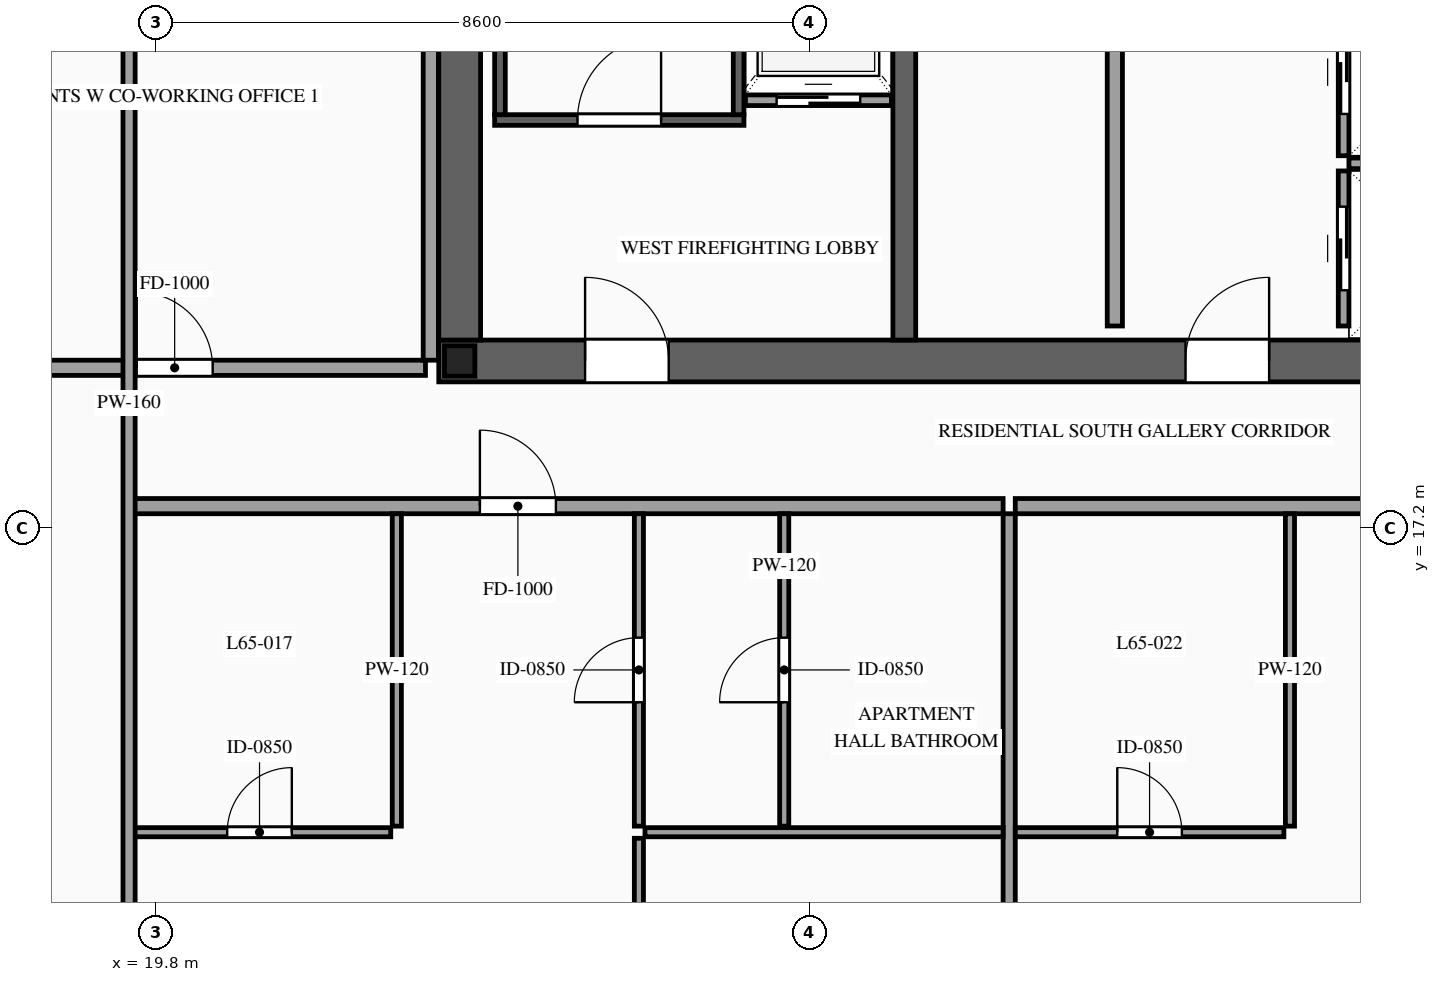
"""IFC4 building model, lengths in metres.
Left out: names, types, materials, properties, quantities, classifications, styles, units other than length and angle.
Written with IfcOpenShell. Run it as: python <this file> out.ifc"""

import sys

from ifc_helpers import new_model, si_unit, direction, frame, frame_2d, origin, origin_2d, place, context, subcontext, project, spatial, rectangle, i_section, extrude, source, transform, mapped, element, fill, save


model = new_model("IFC4")
c1 = context("Model", 3, precision=1e-05, world=origin(), true_north=direction((0.0, 1.0)))
c2 = subcontext(c1, "Body", "Model", "MODEL_VIEW")
j1 = project(units=[si_unit("LENGTHUNIT", "METRE"), si_unit("PLANEANGLEUNIT", "RADIAN")], contexts=[c1])
p1 = place(None, origin())
s1 = spatial("IfcSite", under=j1, at=p1, CompositionType="ELEMENT")
p2 = place(p1, origin())
s2 = spatial("IfcBuilding", under=s1, at=p2, CompositionType="ELEMENT")
p3 = place(p2, frame((0.0, 0.0, 245.1)))
s3 = spatial("IfcBuildingStorey", under=s2, at=p3, CompositionType="ELEMENT", Elevation=245.1)
p4 = place(p3, frame((23.525, 19.4, 0.0), z_axis=(0.0, 0.0, 1.0), x_axis=(1.0, 0.0, 0.0)))
e1 = element("IfcWall", 1, at=p4, inside=s3, PredefinedType="SHEAR", context=c2, shape_type="SweptSolid", body=[
    extrude(rectangle(XDim=26.95, YDim=0.55, at=frame_2d((13.475, 0.0))), origin(), (0.0, 0.0, 1.0), 3.5),
])
p5 = place(p4, frame((1.925, 0.0, 0.0)))
e2 = element("IfcOpeningElement", 2, at=p5, cuts=e1, PredefinedType="OPENING", context=c2, shape_type="SweptSolid", body=[
    extrude(rectangle(XDim=1.1, YDim=2.2, at=frame_2d((0.55, 1.1))), frame((0.0, 0.29, 0.0), z_axis=(0.0, -1.0, 0.0), x_axis=(1.0, 0.0, 0.0)), (0.0, 0.0, 1.0), 0.58),
])
p6 = place(p4, frame((9.825, 0.0, 0.0)))
e3 = element("IfcOpeningElement", 3, at=p6, cuts=e1, PredefinedType="OPENING", context=c2, shape_type="SweptSolid", body=[
    extrude(rectangle(XDim=1.1, YDim=2.2, at=frame_2d((0.55, 1.1))), frame((0.0, 0.29, 0.0), z_axis=(0.0, -1.0, 0.0), x_axis=(1.0, 0.0, 0.0)), (0.0, 0.0, 1.0), 0.58),
])
p7 = place(p4, frame((23.025, 0.0, 0.0)))
e4 = element("IfcOpeningElement", 4, at=p7, cuts=e1, PredefinedType="OPENING", context=c2, shape_type="SweptSolid", body=[
    extrude(rectangle(XDim=1.1, YDim=2.2, at=frame_2d((0.55, 1.1))), frame((0.0, 0.29, 0.0), z_axis=(0.0, -1.0, 0.0), x_axis=(1.0, 0.0, 0.0)), (0.0, 0.0, 1.0), 0.58),
])
p8 = place(p4, frame((19.645, 0.0, 0.0)))
e5 = element("IfcOpeningElement", 5, at=p8, cuts=e1, PredefinedType="OPENING", context=c2, shape_type="SweptSolid", body=[
    extrude(rectangle(XDim=0.9, YDim=2.15, at=frame_2d((0.45, 1.075))), frame((0.0, 0.29, 0.0), z_axis=(0.0, -1.0, 0.0), x_axis=(1.0, 0.0, 0.0)), (0.0, 0.0, 1.0), 0.58),
])
p9 = place(p4, frame((18.205, 0.0, 0.0)))
e6 = element("IfcOpeningElement", 6, at=p9, cuts=e1, PredefinedType="OPENING", context=c2, shape_type="SweptSolid", body=[
    extrude(rectangle(XDim=0.9, YDim=2.15, at=frame_2d((0.45, 1.075))), frame((0.0, 0.29, 0.0), z_axis=(0.0, -1.0, 0.0), x_axis=(1.0, 0.0, 0.0)), (0.0, 0.0, 1.0), 0.58),
])
m1 = source(origin(), c2, "Body", "SweptSolid", [
    extrude(rectangle(XDim=12.25, YDim=0.55, at=frame_2d((6.125, 0.0))), origin(), (0.0, 0.0, 1.0), 3.5),
])
p10 = place(p3, frame((23.8, 19.675, 0.0), z_axis=(0.0, 0.0, 1.0), x_axis=(0.0, 1.0, 0.0)))
e7 = element("IfcWall", 7, at=p10, inside=s3, PredefinedType="SHEAR", context=c2, shape_type="MappedRepresentation", body=[
    mapped(m1, transform((0.0, 0.0, 0.0), scale=1.0)),
])
m2 = source(origin(), c2, "Body", "SweptSolid", [
    extrude(rectangle(XDim=12.25, YDim=0.3, at=frame_2d((6.125, 0.0))), origin(), (0.0, 0.0, 1.0), 3.5),
])
p11 = place(p3, frame((29.65, 19.675, 0.0), z_axis=(0.0, 0.0, 1.0), x_axis=(0.0, 1.0, 0.0)))
e8 = element("IfcWall", 8, at=p11, inside=s3, PredefinedType="SOLIDWALL", context=c2, shape_type="MappedRepresentation", body=[
    mapped(m2, transform((0.0, 0.0, 0.0), scale=1.0)),
])
m3 = source(origin(), c2, "Body", "SweptSolid", [
    extrude(i_section(OverallWidth=0.4, OverallDepth=0.4, WebThickness=0.013, FlangeThickness=0.021, at=origin_2d()), origin(), (0.0, 0.0, 1.0), 3.5),
])
p12 = place(p3, frame((23.8, 19.4, 0.0), z_axis=(0.0, 0.0, 1.0), x_axis=(1.0, 0.0, 0.0)))
e9 = element("IfcColumn", 9, at=p12, inside=s3, PredefinedType="COLUMN", context=c2, shape_type="MappedRepresentation", body=[
    mapped(m3, transform((0.0, 0.0, 0.0), scale=1.0)),
])
p13 = place(p3, frame((27.56, 22.83, 0.0), z_axis=(0.0, 0.0, 1.0), x_axis=(1.0, 0.0, 0.0)))
e10 = element("IfcWall", 10, at=p13, inside=s3, PredefinedType="SOLIDWALL", context=c2, shape_type="SweptSolid", body=[
    extrude(rectangle(XDim=1.92, YDim=0.14, at=frame_2d((0.96, 0.0))), origin(), (0.0, 0.0, 1.0), 3.28),
])
p14 = place(p13, frame((0.41, 0.0, 0.0)))
e11 = element("IfcOpeningElement", 11, at=p14, cuts=e10, PredefinedType="OPENING", context=c2, shape_type="SweptSolid", body=[
    extrude(rectangle(XDim=1.1, YDim=2.2, at=frame_2d((0.55, 1.1))), frame((0.0, 0.085, 0.0), z_axis=(0.0, -1.0, 0.0), x_axis=(1.0, 0.0, 0.0)), (0.0, 0.0, 1.0), 0.17),
])
p15 = place(p3, frame((35.43, 19.86, 0.0), z_axis=(0.0, 0.0, 1.0), x_axis=(0.0, 1.0, 0.0)))
e12 = element("IfcWall", 12, at=p15, inside=s3, PredefinedType="SOLIDWALL", context=c2, shape_type="SweptSolid", body=[
    extrude(rectangle(XDim=2.04, YDim=0.14, at=frame_2d((1.02, 0.0))), origin(), (0.0, 0.0, 1.0), 3.28),
])
p16 = place(p15, frame((0.47, 0.0, 0.0)))
e13 = element("IfcOpeningElement", 13, at=p16, cuts=e12, PredefinedType="OPENING", context=c2, shape_type="SweptSolid", body=[
    extrude(rectangle(XDim=1.1, YDim=2.2, at=frame_2d((0.55, 1.1))), frame((0.0, 0.085, 0.0), z_axis=(0.0, -1.0, 0.0), x_axis=(1.0, 0.0, 0.0)), (0.0, 0.0, 1.0), 0.17),
])
m4 = source(origin(), c2, "Body", "SweptSolid", [
    extrude(rectangle(XDim=2.4, YDim=0.14, at=frame_2d((1.2, 0.0))), origin(), (0.0, 0.0, 1.0), 3.28),
])
p17 = place(p3, frame((35.5, 22.0, 0.0), z_axis=(0.0, 0.0, 1.0), x_axis=(1.0, 0.0, 0.0)))
e14 = element("IfcWall", 14, at=p17, inside=s3, PredefinedType="SOLIDWALL", context=c2, shape_type="MappedRepresentation", body=[
    mapped(m4, transform((0.0, 0.0, 0.0), scale=1.0)),
])
p18 = place(p3, frame((35.43, 22.1, 0.0), z_axis=(0.0, 0.0, 1.0), x_axis=(0.0, 1.0, 0.0)))
e15 = element("IfcWall", 15, at=p18, inside=s3, PredefinedType="SOLIDWALL", context=c2, shape_type="SweptSolid", body=[
    extrude(rectangle(XDim=2.2, YDim=0.14, at=frame_2d((1.1, 0.0))), origin(), (0.0, 0.0, 1.0), 3.28),
])
p19 = place(p18, frame((0.55, 0.0, 0.0)))
e16 = element("IfcOpeningElement", 16, at=p19, cuts=e15, PredefinedType="OPENING", context=c2, shape_type="SweptSolid", body=[
    extrude(rectangle(XDim=1.1, YDim=2.2, at=frame_2d((0.55, 1.1))), frame((0.0, 0.085, 0.0), z_axis=(0.0, -1.0, 0.0), x_axis=(1.0, 0.0, 0.0)), (0.0, 0.0, 1.0), 0.17),
])
p20 = place(p3, frame((24.26, 22.57, 0.0), z_axis=(0.0, 0.0, 1.0), x_axis=(1.0, 0.0, 0.0)))
e17 = element("IfcWall", 17, at=p20, inside=s3, PredefinedType="SOLIDWALL", context=c2, shape_type="SweptSolid", body=[
    extrude(rectangle(XDim=3.28, YDim=0.14, at=frame_2d((1.64, 0.0))), origin(), (0.0, 0.0, 1.0), 3.28),
])
p21 = place(p20, frame((1.09, 0.0, 0.0)))
e18 = element("IfcOpeningElement", 18, at=p21, cuts=e17, PredefinedType="OPENING", context=c2, shape_type="SweptSolid", body=[
    extrude(rectangle(XDim=1.1, YDim=2.2, at=frame_2d((0.55, 1.1))), frame((0.0, 0.085, 0.0), z_axis=(0.0, -1.0, 0.0), x_axis=(1.0, 0.0, 0.0)), (0.0, 0.0, 1.0), 0.17),
])
m5 = source(origin(), c2, "Body", "SweptSolid", [
    extrude(rectangle(XDim=8.94, YDim=0.14, at=frame_2d((4.47, 0.0))), origin(), (0.0, 0.0, 1.0), 3.28),
])
for number, where, z_axis, x_axis in (
    (19, (24.33, 22.64, 0.0), (0.0, 0.0, 1.0), (0.0, 1.0, 0.0)),
    (20, (27.47, 22.64, 0.0), (0.0, 0.0, 1.0), (0.0, 1.0, 0.0)),
):
    element("IfcWall", number, at=place(p3, frame(where, z_axis=z_axis, x_axis=x_axis)), inside=s3, PredefinedType="SOLIDWALL", context=c2, shape_type="MappedRepresentation", body=[
        mapped(m5, transform((0.0, 0.0, 0.0), scale=1.0)),
    ])
p22 = place(p3, frame((32.42, 19.86, 0.0), z_axis=(0.0, 0.0, 1.0), x_axis=(0.0, 1.0, 0.0)))
e21 = element("IfcWall", 21, at=p22, inside=s3, PredefinedType="PARTITIONING", context=c2, shape_type="SweptSolid", body=[
    extrude(rectangle(XDim=11.88, YDim=0.2, at=frame_2d((5.94, 0.0))), origin(), (0.0, 0.0, 1.0), 3.28),
])
p23 = place(p22, frame((5.49, 0.0, 0.0)))
e22 = element("IfcOpeningElement", 22, at=p23, cuts=e21, PredefinedType="OPENING", context=c2, shape_type="SweptSolid", body=[
    extrude(rectangle(XDim=0.9, YDim=2.15, at=frame_2d((0.45, 1.075))), frame((0.0, 0.115, 0.0), z_axis=(0.0, -1.0, 0.0), x_axis=(1.0, 0.0, 0.0)), (0.0, 0.0, 1.0), 0.23),
])
p24 = place(p3, frame((19.44, 17.49, 0.0), z_axis=(0.0, 0.0, 1.0), x_axis=(1.0, 0.0, 0.0)))
e23 = element("IfcWall", 23, at=p24, inside=s3, PredefinedType="PARTITIONING", context=c2, shape_type="SweptSolid", body=[
    extrude(rectangle(XDim=11.51, YDim=0.2, at=frame_2d((5.755, 0.0))), origin(), (0.0, 0.0, 1.0), 3.28),
])
p25 = place(p24, frame((4.626, 0.0, 0.0)))
e24 = element("IfcOpeningElement", 24, at=p25, cuts=e23, PredefinedType="OPENING", context=c2, shape_type="SweptSolid", body=[
    extrude(rectangle(XDim=1.0, YDim=2.2, at=frame_2d((0.5, 1.1))), frame((0.0, 0.115, 0.0), z_axis=(0.0, -1.0, 0.0), x_axis=(1.0, 0.0, 0.0)), (0.0, 0.0, 1.0), 0.23),
])
m6 = source(origin(), c2, "Body", "SweptSolid", [
    extrude(rectangle(XDim=12.04, YDim=0.16, at=frame_2d((6.02, 0.0))), origin(), (0.0, 0.0, 1.0), 3.28),
])
p26 = place(p3, frame((31.03, 5.35, 0.0), z_axis=(0.0, 0.0, 1.0), x_axis=(0.0, 1.0, 0.0)))
e25 = element("IfcWall", 25, at=p26, inside=s3, PredefinedType="PARTITIONING", context=c2, shape_type="MappedRepresentation", body=[
    mapped(m6, transform((0.0, 0.0, 0.0), scale=1.0)),
])
p27 = place(p3, frame((19.44, 13.2, 0.0), z_axis=(0.0, 0.0, 1.0), x_axis=(1.0, 0.0, 0.0)))
e26 = element("IfcWall", 26, at=p27, inside=s3, PredefinedType="PARTITIONING", context=c2, shape_type="SweptSolid", body=[
    extrude(rectangle(XDim=3.453, YDim=0.12, at=frame_2d((1.727, 0.0))), origin(), (0.0, 0.0, 1.0), 3.28),
])
p28 = place(p27, frame((1.302, 0.0, 0.0)))
e27 = element("IfcOpeningElement", 27, at=p28, cuts=e26, PredefinedType="OPENING", context=c2, shape_type="SweptSolid", body=[
    extrude(rectangle(XDim=0.85, YDim=2.1, at=frame_2d((0.425, 1.05))), frame((0.0, 0.075, 0.0), z_axis=(0.0, -1.0, 0.0), x_axis=(1.0, 0.0, 0.0)), (0.0, 0.0, 1.0), 0.15),
])
m7 = source(origin(), c2, "Body", "SweptSolid", [
    extrude(rectangle(XDim=4.11, YDim=0.12, at=frame_2d((2.055, 0.0))), origin(), (0.0, 0.0, 1.0), 3.28),
])
p29 = place(p3, frame((22.973, 13.28, 0.0), z_axis=(0.0, 0.0, 1.0), x_axis=(0.0, 1.0, 0.0)))
e28 = element("IfcWall", 28, at=p29, inside=s3, PredefinedType="PARTITIONING", context=c2, shape_type="MappedRepresentation", body=[
    mapped(m7, transform((0.0, 0.0, 0.0), scale=1.0)),
])
p30 = place(p3, frame((28.07, 13.28, 0.0), z_axis=(0.0, 0.0, 1.0), x_axis=(0.0, 1.0, 0.0)))
e29 = element("IfcWall", 29, at=p30, inside=s3, PredefinedType="PARTITIONING", context=c2, shape_type="SweptSolid", body=[
    extrude(rectangle(XDim=4.11, YDim=0.12, at=frame_2d((2.055, 0.0))), origin(), (0.0, 0.0, 1.0), 3.28),
])
p31 = place(p30, frame((1.63, 0.0, 0.0)))
e30 = element("IfcOpeningElement", 30, at=p31, cuts=e29, PredefinedType="OPENING", context=c2, shape_type="SweptSolid", body=[
    extrude(rectangle(XDim=0.85, YDim=2.1, at=frame_2d((0.425, 1.05))), frame((0.0, 0.075, 0.0), z_axis=(0.0, -1.0, 0.0), x_axis=(1.0, 0.0, 0.0)), (0.0, 0.0, 1.0), 0.15),
])
m8 = source(origin(), c2, "Body", "SweptSolid", [
    extrude(rectangle(XDim=4.712, YDim=0.12, at=frame_2d((2.356, 0.0))), origin(), (0.0, 0.0, 1.0), 3.28),
])
p32 = place(p3, frame((26.238, 13.2, 0.0), z_axis=(0.0, 0.0, 1.0), x_axis=(1.0, 0.0, 0.0)))
e31 = element("IfcWall", 31, at=p32, inside=s3, PredefinedType="PARTITIONING", context=c2, shape_type="MappedRepresentation", body=[
    mapped(m8, transform((0.0, 0.0, 0.0), scale=1.0)),
])
p33 = place(p3, frame((26.158, 5.35, 0.0), z_axis=(0.0, 0.0, 1.0), x_axis=(0.0, 1.0, 0.0)))
e32 = element("IfcWall", 32, at=p33, inside=s3, PredefinedType="PARTITIONING", context=c2, shape_type="SweptSolid", body=[
    extrude(rectangle(XDim=7.77, YDim=0.12, at=frame_2d((3.885, 0.0))), origin(), (0.0, 0.0, 1.0), 3.28),
])
p34 = place(p33, frame((3.435, 0.0, 0.0)))
e33 = element("IfcOpeningElement", 33, at=p34, cuts=e32, PredefinedType="OPENING", context=c2, shape_type="SweptSolid", body=[
    extrude(rectangle(XDim=0.9, YDim=2.15, at=frame_2d((0.45, 1.075))), frame((0.0, 0.075, 0.0), z_axis=(0.0, -1.0, 0.0), x_axis=(1.0, 0.0, 0.0)), (0.0, 0.0, 1.0), 0.15),
])
p35 = place(p3, frame((26.158, 13.28, 0.0), z_axis=(0.0, 0.0, 1.0), x_axis=(0.0, 1.0, 0.0)))
e34 = element("IfcWall", 34, at=p35, inside=s3, PredefinedType="PARTITIONING", context=c2, shape_type="SweptSolid", body=[
    extrude(rectangle(XDim=4.11, YDim=0.12, at=frame_2d((2.055, 0.0))), origin(), (0.0, 0.0, 1.0), 3.28),
])
p36 = place(p35, frame((1.63, 0.0, 0.0)))
e35 = element("IfcOpeningElement", 35, at=p36, cuts=e34, PredefinedType="OPENING", context=c2, shape_type="SweptSolid", body=[
    extrude(rectangle(XDim=0.85, YDim=2.1, at=frame_2d((0.425, 1.05))), frame((0.0, 0.075, 0.0), z_axis=(0.0, -1.0, 0.0), x_axis=(1.0, 0.0, 0.0)), (0.0, 0.0, 1.0), 0.15),
])
p37 = place(p3, frame((31.11, 17.49, 0.0), z_axis=(0.0, 0.0, 1.0), x_axis=(1.0, 0.0, 0.0)))
e36 = element("IfcWall", 36, at=p37, inside=s3, PredefinedType="PARTITIONING", context=c2, shape_type="SweptSolid", body=[
    extrude(rectangle(XDim=11.78, YDim=0.2, at=frame_2d((5.89, 0.0))), origin(), (0.0, 0.0, 1.0), 3.28),
])
p38 = place(p37, frame((4.801, 0.0, 0.0)))
e37 = element("IfcOpeningElement", 37, at=p38, cuts=e36, PredefinedType="OPENING", context=c2, shape_type="SweptSolid", body=[
    extrude(rectangle(XDim=1.0, YDim=2.2, at=frame_2d((0.5, 1.1))), frame((0.0, 0.115, 0.0), z_axis=(0.0, -1.0, 0.0), x_axis=(1.0, 0.0, 0.0)), (0.0, 0.0, 1.0), 0.23),
])
p39 = place(p3, frame((31.11, 13.2, 0.0), z_axis=(0.0, 0.0, 1.0), x_axis=(1.0, 0.0, 0.0)))
e38 = element("IfcWall", 38, at=p39, inside=s3, PredefinedType="PARTITIONING", context=c2, shape_type="SweptSolid", body=[
    extrude(rectangle(XDim=3.534, YDim=0.12, at=frame_2d((1.767, 0.0))), origin(), (0.0, 0.0, 1.0), 3.28),
])
p40 = place(p39, frame((1.342, 0.0, 0.0)))
e39 = element("IfcOpeningElement", 39, at=p40, cuts=e38, PredefinedType="OPENING", context=c2, shape_type="SweptSolid", body=[
    extrude(rectangle(XDim=0.85, YDim=2.1, at=frame_2d((0.425, 1.05))), frame((0.0, 0.075, 0.0), z_axis=(0.0, -1.0, 0.0), x_axis=(1.0, 0.0, 0.0)), (0.0, 0.0, 1.0), 0.15),
])
p41 = place(p3, frame((34.724, 13.28, 0.0), z_axis=(0.0, 0.0, 1.0), x_axis=(0.0, 1.0, 0.0)))
e40 = element("IfcWall", 40, at=p41, inside=s3, PredefinedType="PARTITIONING", context=c2, shape_type="MappedRepresentation", body=[
    mapped(m7, transform((0.0, 0.0, 0.0), scale=1.0)),
])
p42 = place(p3, frame((16.55, 19.31, 0.0), z_axis=(0.0, 0.0, 1.0), x_axis=(1.0, 0.0, 0.0)))
e41 = element("IfcWall", 41, at=p42, inside=s3, PredefinedType="PARTITIONING", context=c2, shape_type="SweptSolid", body=[
    extrude(rectangle(XDim=6.8, YDim=0.2, at=frame_2d((3.4, 0.0))), origin(), (0.0, 0.0, 1.0), 2.825),
])
p43 = place(p42, frame((3.0, 0.0, 0.0)))
e42 = element("IfcOpeningElement", 42, at=p43, cuts=e41, PredefinedType="OPENING", context=c2, shape_type="SweptSolid", body=[
    extrude(rectangle(XDim=1.0, YDim=2.2, at=frame_2d((0.5, 1.1))), frame((0.0, 0.115, 0.0), z_axis=(0.0, -1.0, 0.0), x_axis=(1.0, 0.0, 0.0)), (0.0, 0.0, 1.0), 0.23),
])
m9 = source(origin(), c2, "Body", "SweptSolid", [
    extrude(rectangle(XDim=6.29, YDim=0.2, at=frame_2d((3.145, 0.0))), origin(), (0.0, 0.0, 1.0), 3.28),
])
p44 = place(p3, frame((23.42, 19.41, 0.0), z_axis=(0.0, 0.0, 1.0), x_axis=(0.0, 1.0, 0.0)))
e43 = element("IfcWall", 43, at=p44, inside=s3, PredefinedType="PARTITIONING", context=c2, shape_type="MappedRepresentation", body=[
    mapped(m9, transform((0.0, 0.0, 0.0), scale=1.0)),
])
m10 = source(origin(), c2, "Body", "SweptSolid", [
    extrude(rectangle(XDim=26.69, YDim=0.16, at=frame_2d((13.345, 0.0))), origin(), (0.0, 0.0, 1.0), 3.28),
])
p45 = place(p3, frame((19.45, 5.5, 0.0), z_axis=(0.0, 0.0, 1.0), x_axis=(0.0, 1.0, 0.0)))
e44 = element("IfcWall", 44, at=p45, inside=s3, PredefinedType="PARTITIONING", context=c2, shape_type="MappedRepresentation", body=[
    mapped(m10, transform((0.0, 0.0, 0.0), scale=1.0)),
])
m11 = source(origin(), c2, "Body", "SweptSolid", [
    extrude(rectangle(XDim=1.1, YDim=2.2, at=frame_2d((0.55, 1.1))), frame((0.0, 0.025, 0.0), z_axis=(0.0, -1.0, 0.0), x_axis=(1.0, 0.0, 0.0)), (0.0, 0.0, 1.0), 0.05),
])
p46 = place(p14, origin())
e45 = element("IfcDoor", 45, at=p46, inside=s3, OperationType="SLIDING_TO_LEFT", PredefinedType="DOOR", context=c2, shape_type="MappedRepresentation", body=[
    mapped(m11, transform((0.0, 0.0, 0.0), scale=1.0)),
])
fill(e11, e45)
p47 = place(p16, origin())
e46 = element("IfcDoor", 46, at=p47, inside=s3, OperationType="SLIDING_TO_RIGHT", PredefinedType="DOOR", context=c2, shape_type="MappedRepresentation", body=[
    mapped(m11, transform((0.0, 0.0, 0.0), scale=1.0)),
])
fill(e13, e46)
p48 = place(p19, origin())
e47 = element("IfcDoor", 47, at=p48, inside=s3, OperationType="SLIDING_TO_LEFT", PredefinedType="DOOR", context=c2, shape_type="MappedRepresentation", body=[
    mapped(m11, transform((0.0, 0.0, 0.0), scale=1.0)),
])
fill(e16, e47)
m12 = source(origin(), c2, "Body", "SweptSolid", [
    extrude(rectangle(XDim=1.1, YDim=2.2, at=frame_2d((0.55, 1.1))), frame((0.0, 0.025, 0.0), z_axis=(0.0, -1.0, 0.0), x_axis=(1.0, 0.0, 0.0)), (0.0, 0.0, 1.0), 0.05),
])
p49 = place(p21, origin())
e48 = element("IfcDoor", 48, at=p49, inside=s3, OperationType="SINGLE_SWING_RIGHT", PredefinedType="DOOR", context=c2, shape_type="MappedRepresentation", body=[
    mapped(m12, transform((0.0, 0.0, 0.0), scale=1.0)),
])
fill(e18, e48)
p50 = place(p5, origin())
e49 = element("IfcDoor", 49, at=p50, inside=s3, OperationType="SINGLE_SWING_LEFT", PredefinedType="DOOR", context=c2, shape_type="MappedRepresentation", body=[
    mapped(m12, transform((0.0, 0.0, 0.0), scale=1.0)),
])
fill(e2, e49)
p51 = place(p6, origin())
e50 = element("IfcDoor", 50, at=p51, inside=s3, OperationType="SINGLE_SWING_RIGHT", PredefinedType="DOOR", context=c2, shape_type="MappedRepresentation", body=[
    mapped(m12, transform((0.0, 0.0, 0.0), scale=1.0)),
])
fill(e3, e50)
m13 = source(origin(), c2, "Body", "SweptSolid", [
    extrude(rectangle(XDim=1.0, YDim=2.2, at=frame_2d((0.5, 1.1))), frame((0.0, 0.025, 0.0), z_axis=(0.0, -1.0, 0.0), x_axis=(1.0, 0.0, 0.0)), (0.0, 0.0, 1.0), 0.05),
])
p52 = place(p25, origin())
e51 = element("IfcDoor", 51, at=p52, inside=s3, OperationType="SINGLE_SWING_LEFT", PredefinedType="DOOR", context=c2, shape_type="MappedRepresentation", body=[
    mapped(m13, transform((0.0, 0.0, 0.0), scale=1.0)),
])
fill(e24, e51)
m14 = source(origin(), c2, "Body", "SweptSolid", [
    extrude(rectangle(XDim=0.85, YDim=2.1, at=frame_2d((0.425, 1.05))), frame((0.0, 0.025, 0.0), z_axis=(0.0, -1.0, 0.0), x_axis=(1.0, 0.0, 0.0)), (0.0, 0.0, 1.0), 0.05),
])
p53 = place(p28, origin())
e52 = element("IfcDoor", 52, at=p53, inside=s3, OperationType="SINGLE_SWING_RIGHT", PredefinedType="DOOR", context=c2, shape_type="MappedRepresentation", body=[
    mapped(m14, transform((0.0, 0.0, 0.0), scale=1.0)),
])
fill(e27, e52)
p54 = place(p31, origin())
e53 = element("IfcDoor", 53, at=p54, inside=s3, OperationType="SINGLE_SWING_LEFT", PredefinedType="DOOR", context=c2, shape_type="MappedRepresentation", body=[
    mapped(m14, transform((0.0, 0.0, 0.0), scale=1.0)),
])
fill(e30, e53)
p55 = place(p36, origin())
e54 = element("IfcDoor", 54, at=p55, inside=s3, OperationType="SINGLE_SWING_LEFT", PredefinedType="DOOR", context=c2, shape_type="MappedRepresentation", body=[
    mapped(m14, transform((0.0, 0.0, 0.0), scale=1.0)),
])
fill(e35, e54)
p56 = place(p40, origin())
e55 = element("IfcDoor", 55, at=p56, inside=s3, OperationType="SINGLE_SWING_LEFT", PredefinedType="DOOR", context=c2, shape_type="MappedRepresentation", body=[
    mapped(m14, transform((0.0, 0.0, 0.0), scale=1.0)),
])
fill(e39, e55)
p57 = place(p43, origin())
e56 = element("IfcDoor", 56, at=p57, inside=s3, OperationType="SINGLE_SWING_LEFT", PredefinedType="DOOR", context=c2, shape_type="MappedRepresentation", body=[
    mapped(m13, transform((0.0, 0.0, 0.0), scale=1.0)),
])
fill(e42, e56)
save(model, sys.argv[1])
